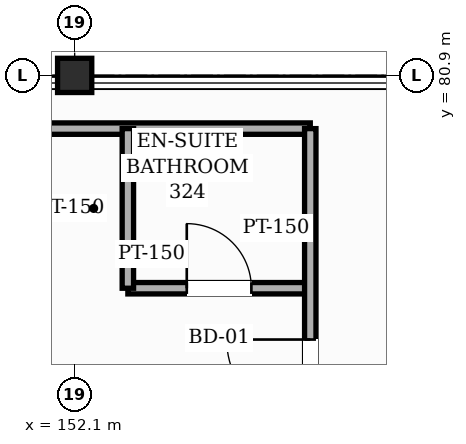
"""IFC4 building model, lengths in metres.
Left out: names, types, materials, properties, quantities, classifications, styles, units other than length and angle.
Written with IfcOpenShell. Run it as: python <this file> out.ifc"""

import sys

from ifc_helpers import new_model, si_unit, direction, frame, frame_2d, origin, origin_2d, place, context, subcontext, project, spatial, rectangle, hollow_rectangle, extrude, element, fill, save


model = new_model("IFC4")
c1 = context("Model", 3, precision=1e-05, world=origin(), true_north=direction((0.0, 1.0)))
c2 = subcontext(c1, "Body", "Model", "MODEL_VIEW")
j1 = project(units=[si_unit("LENGTHUNIT", "METRE"), si_unit("PLANEANGLEUNIT", "RADIAN")], contexts=[c1])
p1 = place(None, origin())
s1 = spatial("IfcSite", under=j1, at=p1, CompositionType="ELEMENT")
p2 = place(p1, origin())
s2 = spatial("IfcBuilding", under=s1, at=p2, CompositionType="ELEMENT")
p3 = place(p2, frame((0.0, 0.0, 46.2)))
s3 = spatial("IfcBuildingStorey", under=s2, at=p3, CompositionType="ELEMENT", Elevation=46.2)
p4 = place(p3, frame((152.1, 80.9, 0.0), z_axis=(0.0, 0.0, 1.0), x_axis=(1.0, 0.0, 0.0)))
e1 = element("IfcColumn", 1, at=p4, inside=s3, PredefinedType="COLUMN", context=c2, shape_type="SweptSolid", body=[
    extrude(hollow_rectangle(XDim=0.45, YDim=0.45, WallThickness=0.019, InnerFilletRadius=0.019, OuterFilletRadius=0.038, at=origin_2d()), origin(), (0.0, 0.0, 1.0), 3.99),
])
p5 = place(p3, frame((152.8, 78.1, 0.0), z_axis=(0.0, 0.0, 1.0), x_axis=(1.0, 0.0, 0.0)))
e2 = element("IfcWall", 2, at=p5, inside=s3, PredefinedType="PARTITIONING", context=c2, shape_type="SweptSolid", body=[
    extrude(rectangle(XDim=2.4, YDim=0.15, at=frame_2d((1.2, 0.0))), origin(), (0.0, 0.0, 1.0), 3.935),
])
p6 = place(p5, frame((0.775, 0.0, 0.0)))
e3 = element("IfcOpeningElement", 3, at=p6, cuts=e2, PredefinedType="OPENING", context=c2, shape_type="SweptSolid", body=[
    extrude(rectangle(XDim=0.85, YDim=2.1, at=frame_2d((0.425, 1.05))), frame((0.0, 0.085, 0.0), z_axis=(0.0, -1.0, 0.0), x_axis=(1.0, 0.0, 0.0)), (0.0, 0.0, 1.0), 0.17),
])
p7 = place(p3, frame((144.2, 80.2, 0.0), z_axis=(0.0, 0.0, 1.0), x_axis=(1.0, 0.0, 0.0)))
e4 = element("IfcWall", 4, at=p7, inside=s3, PredefinedType="PARTITIONING", context=c2, shape_type="SweptSolid", body=[
    extrude(rectangle(XDim=11.0, YDim=0.15, at=frame_2d((5.5, 0.0))), origin(), (0.0, 0.0, 1.0), 3.935),
])
p8 = place(p3, frame((152.8, 78.1, 0.0), z_axis=(0.0, 0.0, 1.0), x_axis=(0.0, 1.0, 0.0)))
e5 = element("IfcWall", 5, at=p8, inside=s3, PredefinedType="PARTITIONING", context=c2, shape_type="SweptSolid", body=[
    extrude(rectangle(XDim=2.1, YDim=0.15, at=frame_2d((1.05, 0.0))), origin(), (0.0, 0.0, 1.0), 3.935),
])
p9 = place(p3, frame((155.2, 62.0, 0.0), z_axis=(0.0, 0.0, 1.0), x_axis=(0.0, 1.0, 0.0)))
e6 = element("IfcWall", 6, at=p9, inside=s3, PredefinedType="PARTITIONING", context=c2, shape_type="SweptSolid", body=[
    extrude(rectangle(XDim=18.2, YDim=0.15, at=frame_2d((9.1, 0.0))), origin(), (0.0, 0.0, 1.0), 3.935),
])
p10 = place(p9, frame((0.675, 0.0, 0.0)))
e7 = element("IfcOpeningElement", 7, at=p10, cuts=e6, PredefinedType="OPENING", context=c2, shape_type="SweptSolid", body=[
    extrude(rectangle(XDim=1.1, YDim=2.2, at=frame_2d((0.55, 1.1))), frame((0.0, 0.085, 0.0), z_axis=(0.0, -1.0, 0.0), x_axis=(1.0, 0.0, 0.0)), (0.0, 0.0, 1.0), 0.17),
])
p11 = place(p9, frame((5.225, 0.0, 0.0)))
e8 = element("IfcOpeningElement", 8, at=p11, cuts=e6, PredefinedType="OPENING", context=c2, shape_type="SweptSolid", body=[
    extrude(rectangle(XDim=1.1, YDim=2.2, at=frame_2d((0.55, 1.1))), frame((0.0, 0.085, 0.0), z_axis=(0.0, -1.0, 0.0), x_axis=(1.0, 0.0, 0.0)), (0.0, 0.0, 1.0), 0.17),
])
p12 = place(p9, frame((9.775, 0.0, 0.0)))
e9 = element("IfcOpeningElement", 9, at=p12, cuts=e6, PredefinedType="OPENING", context=c2, shape_type="SweptSolid", body=[
    extrude(rectangle(XDim=1.1, YDim=2.2, at=frame_2d((0.55, 1.1))), frame((0.0, 0.085, 0.0), z_axis=(0.0, -1.0, 0.0), x_axis=(1.0, 0.0, 0.0)), (0.0, 0.0, 1.0), 0.17),
])
p13 = place(p9, frame((14.325, 0.0, 0.0)))
e10 = element("IfcOpeningElement", 10, at=p13, cuts=e6, PredefinedType="OPENING", context=c2, shape_type="SweptSolid", body=[
    extrude(rectangle(XDim=1.1, YDim=2.2, at=frame_2d((0.55, 1.1))), frame((0.0, 0.085, 0.0), z_axis=(0.0, -1.0, 0.0), x_axis=(1.0, 0.0, 0.0)), (0.0, 0.0, 1.0), 0.17),
])
p14 = place(p13, origin())
e11 = element("IfcDoor", 11, at=p14, inside=s3, OperationType="SINGLE_SWING_RIGHT", PredefinedType="DOOR", context=c2, shape_type="SweptSolid", body=[
    extrude(rectangle(XDim=1.1, YDim=2.2, at=frame_2d((0.55, 1.1))), frame((0.0, 0.025, 0.0), z_axis=(0.0, -1.0, 0.0), x_axis=(1.0, 0.0, 0.0)), (0.0, 0.0, 1.0), 0.05),
])
fill(e10, e11)
p15 = place(p6, origin())
e12 = element("IfcDoor", 12, at=p15, inside=s3, OperationType="SINGLE_SWING_LEFT", PredefinedType="DOOR", context=c2, shape_type="SweptSolid", body=[
    extrude(rectangle(XDim=0.85, YDim=2.1, at=frame_2d((0.425, 1.05))), frame((0.0, 0.025, 0.0), z_axis=(0.0, -1.0, 0.0), x_axis=(1.0, 0.0, 0.0)), (0.0, 0.0, 1.0), 0.05),
])
fill(e3, e12)
save(model, sys.argv[1])
